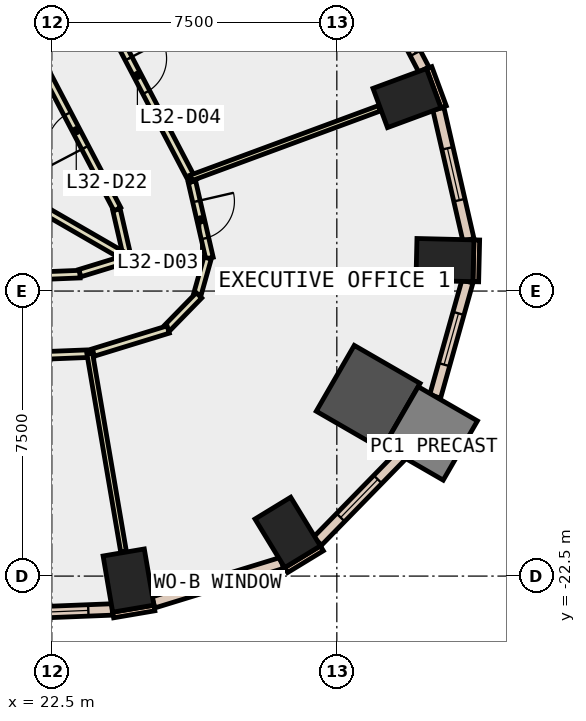
"""IFC4 building model, lengths in metres.
Left out: names, types, materials, properties, quantities, classifications, styles, units other than length and angle.
Written with IfcOpenShell. Run it as: python <this file> out.ifc"""

import sys

from ifc_helpers import new_model, si_unit, direction, frame, frame_2d, origin, origin_2d, place, context, subcontext, project, spatial, rectangle, extrude, element, fill, save


model = new_model("IFC4")
c1 = context("Model", 3, precision=1e-05, world=origin(), true_north=direction((0.0, 1.0)))
c2 = subcontext(c1, "Body", "Model", "MODEL_VIEW")
j1 = project(units=[si_unit("LENGTHUNIT", "METRE"), si_unit("PLANEANGLEUNIT", "RADIAN")], contexts=[c1])
p1 = place(None, origin())
s1 = spatial("IfcSite", under=j1, at=p1, CompositionType="ELEMENT")
p2 = place(p1, origin())
s2 = spatial("IfcBuilding", under=s1, at=p2, CompositionType="ELEMENT")
p3 = place(p2, frame((0.0, 0.0, 146.6)))
s3 = spatial("IfcBuildingStorey", under=s2, at=p3, CompositionType="ELEMENT", Elevation=146.6)
for number, where, z_axis, x_axis in (
    (1, (24.518, -22.618, -0.4), (0.0, 0.0, 1.0), (0.986, 0.168, 0.0)),
    (2, (28.707, -21.352, -0.4), (0.0, 0.0, 1.0), (0.854, 0.521, 0.0)),
):
    element("IfcColumn", number, at=place(p3, frame(where, z_axis=z_axis, x_axis=x_axis)), inside=s3, PredefinedType="COLUMN", context=c2, shape_type="SweptSolid", body=[
        extrude(rectangle(XDim=1.1, YDim=1.5, at=origin_2d()), origin(), (0.0, 0.0, 1.0), 4.2),
    ])
p4 = place(p3, frame((30.825, -17.796, -0.4), z_axis=(0.0, 0.0, 1.0), x_axis=(-0.866025403784, 0.5, 0.0)))
e3 = element("IfcColumn", 3, at=p4, inside=s3, PredefinedType="COLUMN", context=c2, shape_type="SweptSolid", body=[
    extrude(rectangle(XDim=2.0, YDim=2.0, at=origin_2d()), origin(), (0.0, 0.0, 1.0), 4.2),
])
for number, where, z_axis, x_axis in (
    (4, (32.845, -14.185, -0.4), (0.0, 0.0, 1.0), (0.024, 1.0, 0.0)),
    (5, (31.846, -9.923, -0.4), (0.0, 0.0, 1.0), (-0.347, 0.938, 0.0)),
):
    element("IfcColumn", number, at=place(p3, frame(where, z_axis=z_axis, x_axis=x_axis)), inside=s3, PredefinedType="COLUMN", context=c2, shape_type="SweptSolid", body=[
        extrude(rectangle(XDim=1.1, YDim=1.5, at=origin_2d()), origin(), (0.0, 0.0, 1.0), 4.2),
    ])
p5 = place(p3, frame((32.47, -18.746, -0.4), z_axis=(0.0, 0.0, 1.0), x_axis=(-0.866025403784, 0.5, 0.0)))
e6 = element("IfcColumn", 6, at=p5, inside=s3, PredefinedType="COLUMN", context=c2, shape_type="SweptSolid", body=[
    extrude(rectangle(XDim=1.8, YDim=1.8, at=origin_2d()), origin(), (0.0, 0.0, 1.0), 4.2),
])
p6 = place(p3, frame((32.81, -10.153, 0.0), z_axis=(0.0, 0.0, 1.0), x_axis=(-0.346425160624, 0.93807761304, 0.0)))
e7 = element("IfcWall", 7, at=p6, inside=s3, PredefinedType="STANDARD", context=c2, shape_type="SweptSolid", body=[
    extrude(rectangle(XDim=1.1, YDim=0.15, at=frame_2d((0.55, 0.0))), origin(), (0.0, 0.0, 1.0), 3.8),
])
p7 = place(p3, frame((24.114, -23.524, 0.0), z_axis=(0.0, 0.0, 1.0), x_axis=(0.985800082077, 0.167923191299, 0.0)))
e8 = element("IfcWall", 8, at=p7, inside=s3, PredefinedType="STANDARD", context=c2, shape_type="SweptSolid", body=[
    extrude(rectangle(XDim=1.101, YDim=0.15, at=frame_2d((0.55, 0.0))), origin(), (0.0, 0.0, 1.0), 3.8),
])
p8 = place(p3, frame((28.667, -22.342, 0.0), z_axis=(0.0, 0.0, 1.0), x_axis=(0.854005542721, 0.520263907071, 0.0)))
e9 = element("IfcWall", 9, at=p8, inside=s3, PredefinedType="STANDARD", context=c2, shape_type="SweptSolid", body=[
    extrude(rectangle(XDim=1.099, YDim=0.15, at=frame_2d((0.55, 0.0))), origin(), (0.0, 0.0, 1.0), 3.8),
])
p9 = place(p3, frame((33.657, -14.755, 0.0), z_axis=(0.0, 0.0, 1.0), x_axis=(0.023744690764, 0.999718055084, 0.0)))
e10 = element("IfcWall", 10, at=p9, inside=s3, PredefinedType="STANDARD", context=c2, shape_type="SweptSolid", body=[
    extrude(rectangle(XDim=1.1, YDim=0.15, at=frame_2d((0.55, 0.0))), origin(), (0.0, 0.0, 1.0), 3.8),
])
p10 = place(p3, frame((16.778, -23.67, 0.0), z_axis=(0.0, 0.0, 1.0), x_axis=(0.999203621229, 0.039901420066, 0.0)))
e11 = element("IfcWall", 11, at=p10, inside=s3, PredefinedType="STANDARD", context=c2, shape_type="SweptSolid", body=[
    extrude(rectangle(XDim=7.318, YDim=0.3, at=frame_2d((3.659, 0.0))), origin(), (0.0, 0.0, 1.0), 3.8),
])
p11 = place(p10, frame((0.629, 0.0, 0.9)))
e12 = element("IfcOpeningElement", 12, at=p11, cuts=e11, PredefinedType="OPENING", context=c2, shape_type="SweptSolid", body=[
    extrude(rectangle(XDim=2.4, YDim=2.6, at=frame_2d((1.2, 1.3))), frame((0.0, 0.16, 0.0), z_axis=(0.0, -1.0, 0.0), x_axis=(1.0, 0.0, 0.0)), (0.0, 0.0, 1.0), 0.32),
])
p12 = place(p10, frame((4.288, 0.0, 0.9)))
e13 = element("IfcOpeningElement", 13, at=p12, cuts=e11, PredefinedType="OPENING", context=c2, shape_type="SweptSolid", body=[
    extrude(rectangle(XDim=2.4, YDim=2.6, at=frame_2d((1.2, 1.3))), frame((0.0, 0.16, 0.0), z_axis=(0.0, -1.0, 0.0), x_axis=(1.0, 0.0, 0.0)), (0.0, 0.0, 1.0), 0.32),
])
p13 = place(p3, frame((25.173, -23.193, 0.0), z_axis=(0.0, 0.0, 1.0), x_axis=(0.955874475611, 0.293775402094, 0.0)))
e14 = element("IfcWall", 14, at=p13, inside=s3, PredefinedType="STANDARD", context=c2, shape_type="SweptSolid", body=[
    extrude(rectangle(XDim=3.537, YDim=0.3, at=frame_2d((1.769, 0.0))), origin(), (0.0, 0.0, 1.0), 3.8),
])
p14 = place(p13, frame((1.069, 0.0, 0.9)))
e15 = element("IfcOpeningElement", 15, at=p14, cuts=e14, PredefinedType="OPENING", context=c2, shape_type="SweptSolid", body=[
    extrude(rectangle(XDim=1.4, YDim=2.6, at=frame_2d((0.7, 1.3))), frame((0.0, 0.16, 0.0), z_axis=(0.0, -1.0, 0.0), x_axis=(1.0, 0.0, 0.0)), (0.0, 0.0, 1.0), 0.32),
])
p15 = place(p3, frame((29.491, -21.582, 0.0), z_axis=(0.0, 0.0, 1.0), x_axis=(0.698633260198, 0.715479956215, 0.0)))
e16 = element("IfcWall", 16, at=p15, inside=s3, PredefinedType="STANDARD", context=c2, shape_type="SweptSolid", body=[
    extrude(rectangle(XDim=3.145, YDim=0.3, at=frame_2d((1.572, 0.0))), origin(), (0.0, 0.0, 1.0), 3.8),
])
p16 = place(p15, frame((0.872, 0.0, 0.9)))
e17 = element("IfcOpeningElement", 17, at=p16, cuts=e16, PredefinedType="OPENING", context=c2, shape_type="SweptSolid", body=[
    extrude(rectangle(XDim=1.4, YDim=2.6, at=frame_2d((0.7, 1.3))), frame((0.0, 0.16, 0.0), z_axis=(0.0, -1.0, 0.0), x_axis=(1.0, 0.0, 0.0)), (0.0, 0.0, 1.0), 0.32),
])
p17 = place(p3, frame((32.587, -17.775, 0.0), z_axis=(0.0, 0.0, 1.0), x_axis=(0.270471130801, 0.962728085912, 0.0)))
e18 = element("IfcWall", 18, at=p17, inside=s3, PredefinedType="STANDARD", context=c2, shape_type="SweptSolid", body=[
    extrude(rectangle(XDim=3.143, YDim=0.3, at=frame_2d((1.572, 0.0))), origin(), (0.0, 0.0, 1.0), 3.8),
])
p18 = place(p17, frame((0.872, 0.0, 0.9)))
e19 = element("IfcOpeningElement", 19, at=p18, cuts=e18, PredefinedType="OPENING", context=c2, shape_type="SweptSolid", body=[
    extrude(rectangle(XDim=1.4, YDim=2.6, at=frame_2d((0.7, 1.3))), frame((0.0, 0.16, 0.0), z_axis=(0.0, -1.0, 0.0), x_axis=(1.0, 0.0, 0.0)), (0.0, 0.0, 1.0), 0.32),
])
p19 = place(p3, frame((33.463, -13.651, 0.0), z_axis=(0.0, 0.0, 1.0), x_axis=(-0.223538714932, 0.974695051247, 0.0)))
e20 = element("IfcWall", 20, at=p19, inside=s3, PredefinedType="STANDARD", context=c2, shape_type="SweptSolid", body=[
    extrude(rectangle(XDim=3.538, YDim=0.3, at=frame_2d((1.769, 0.0))), origin(), (0.0, 0.0, 1.0), 3.8),
])
p20 = place(p19, frame((1.069, 0.0, 0.9)))
e21 = element("IfcOpeningElement", 21, at=p20, cuts=e20, PredefinedType="OPENING", context=c2, shape_type="SweptSolid", body=[
    extrude(rectangle(XDim=1.4, YDim=2.6, at=frame_2d((0.7, 1.3))), frame((0.0, 0.16, 0.0), z_axis=(0.0, -1.0, 0.0), x_axis=(1.0, 0.0, 0.0)), (0.0, 0.0, 1.0), 0.32),
])
p21 = place(p3, frame((32.291, -9.173, 0.0), z_axis=(0.0, 0.0, 1.0), x_axis=(-0.463809970306, 0.885934710599, 0.0)))
e22 = element("IfcWall", 22, at=p21, inside=s3, PredefinedType="STANDARD", context=c2, shape_type="SweptSolid", body=[
    extrude(rectangle(XDim=5.927, YDim=0.3, at=frame_2d((2.963, 0.0))), origin(), (0.0, 0.0, 1.0), 3.8),
])
p22 = place(p21, frame((0.482, 0.0, 0.9)))
e23 = element("IfcOpeningElement", 23, at=p22, cuts=e22, PredefinedType="OPENING", context=c2, shape_type="SweptSolid", body=[
    extrude(rectangle(XDim=2.0, YDim=2.6, at=frame_2d((1.0, 1.3))), frame((0.0, 0.16, 0.0), z_axis=(0.0, -1.0, 0.0), x_axis=(1.0, 0.0, 0.0)), (0.0, 0.0, 1.0), 0.32),
])
p23 = place(p21, frame((3.445, 0.0, 0.9)))
e24 = element("IfcOpeningElement", 24, at=p23, cuts=e22, PredefinedType="OPENING", context=c2, shape_type="SweptSolid", body=[
    extrude(rectangle(XDim=2.0, YDim=2.6, at=frame_2d((1.0, 1.3))), frame((0.0, 0.16, 0.0), z_axis=(0.0, -1.0, 0.0), x_axis=(1.0, 0.0, 0.0)), (0.0, 0.0, 1.0), 0.32),
])
p24 = place(p3, frame((18.585, -14.741, 0.0), z_axis=(0.0, 0.0, 1.0), x_axis=(0.99920304932, 0.039915739113, 0.0)))
e25 = element("IfcWall", 25, at=p24, inside=s3, PredefinedType="PARTITIONING", context=c2, shape_type="SweptSolid", body=[
    extrude(rectangle(XDim=4.661, YDim=0.2, at=frame_2d((2.33, 0.0))), origin(), (0.0, 0.0, 1.0), 3.8),
])
p25 = place(p24, frame((1.83, 0.0, 0.0)))
e26 = element("IfcOpeningElement", 26, at=p25, cuts=e25, PredefinedType="OPENING", context=c2, shape_type="SweptSolid", body=[
    extrude(rectangle(XDim=1.0, YDim=2.1, at=frame_2d((0.5, 1.05))), frame((0.0, 0.11, 0.0), z_axis=(0.0, -1.0, 0.0), x_axis=(1.0, 0.0, 0.0)), (0.0, 0.0, 1.0), 0.22),
])
p26 = place(p3, frame((23.238, -14.529, 0.0), z_axis=(0.0, 0.0, 1.0), x_axis=(0.956086269468, 0.293085389152, 0.0)))
e27 = element("IfcWall", 27, at=p26, inside=s3, PredefinedType="PARTITIONING", context=c2, shape_type="SweptSolid", body=[
    extrude(rectangle(XDim=1.252, YDim=0.2, at=frame_2d((0.626, 0.0))), origin(), (0.0, 0.0, 1.0), 3.8),
])
p27 = place(p3, frame((24.482, -14.081, 0.0), z_axis=(0.0, 0.0, 1.0), x_axis=(-0.223967203961, 0.974596681479, 0.0)))
e28 = element("IfcWall", 28, at=p27, inside=s3, PredefinedType="PARTITIONING", context=c2, shape_type="SweptSolid", body=[
    extrude(rectangle(XDim=1.259, YDim=0.2, at=frame_2d((0.629, 0.0))), origin(), (0.0, 0.0, 1.0), 3.8),
])
p28 = place(p3, frame((24.224, -12.845, 0.0), z_axis=(0.0, 0.0, 1.0), x_axis=(-0.463819025987, 0.885929969655, 0.0)))
e29 = element("IfcWall", 29, at=p28, inside=s3, PredefinedType="PARTITIONING", context=c2, shape_type="SweptSolid", body=[
    extrude(rectangle(XDim=4.659, YDim=0.2, at=frame_2d((2.33, 0.0))), origin(), (0.0, 0.0, 1.0), 3.8),
])
p29 = place(p28, frame((1.83, 0.0, 0.0)))
e30 = element("IfcOpeningElement", 30, at=p29, cuts=e29, PredefinedType="OPENING", context=c2, shape_type="SweptSolid", body=[
    extrude(rectangle(XDim=1.0, YDim=2.1, at=frame_2d((0.5, 1.05))), frame((0.0, 0.11, 0.0), z_axis=(0.0, -1.0, 0.0), x_axis=(1.0, 0.0, 0.0)), (0.0, 0.0, 1.0), 0.22),
])
p30 = place(p3, frame((23.598, -16.642, 0.0), z_axis=(0.0, 0.0, 1.0), x_axis=(-0.999203655486, -0.039900562205, 0.0)))
e31 = element("IfcWall", 31, at=p30, inside=s3, PredefinedType="PARTITIONING", context=c2, shape_type="SweptSolid", body=[
    extrude(rectangle(XDim=7.514, YDim=0.2, at=frame_2d((3.757, 0.0))), origin(), (0.0, 0.0, 1.0), 3.8),
])
p31 = place(p30, frame((3.332, 0.0, 0.0)))
e32 = element("IfcOpeningElement", 32, at=p31, cuts=e31, PredefinedType="OPENING", context=c2, shape_type="SweptSolid", body=[
    extrude(rectangle(XDim=1.0, YDim=2.1, at=frame_2d((0.5, 1.05))), frame((0.0, 0.11, 0.0), z_axis=(0.0, -1.0, 0.0), x_axis=(1.0, 0.0, 0.0)), (0.0, 0.0, 1.0), 0.22),
])
p32 = place(p3, frame((26.186, -12.12, 0.0), z_axis=(0.0, 0.0, 1.0), x_axis=(0.224108401048, -0.974564222912, 0.0)))
e33 = element("IfcWall", 33, at=p32, inside=s3, PredefinedType="PARTITIONING", context=c2, shape_type="SweptSolid", body=[
    extrude(rectangle(XDim=2.065, YDim=0.2, at=frame_2d((1.033, 0.0))), origin(), (0.0, 0.0, 1.0), 3.8),
])
p33 = place(p32, frame((0.533, 0.0, 0.0)))
e34 = element("IfcOpeningElement", 34, at=p33, cuts=e33, PredefinedType="OPENING", context=c2, shape_type="SweptSolid", body=[
    extrude(rectangle(XDim=1.0, YDim=2.1, at=frame_2d((0.5, 1.05))), frame((0.0, 0.11, 0.0), z_axis=(0.0, -1.0, 0.0), x_axis=(1.0, 0.0, 0.0)), (0.0, 0.0, 1.0), 0.22),
])
p34 = place(p3, frame((26.599, -14.132, 0.0), z_axis=(0.0, 0.0, 1.0), x_axis=(-0.270631784819, -0.962682936925, 0.0)))
e35 = element("IfcWall", 35, at=p34, inside=s3, PredefinedType="PARTITIONING", context=c2, shape_type="SweptSolid", body=[
    extrude(rectangle(XDim=0.994, YDim=0.2, at=frame_2d((0.497, 0.0))), origin(), (0.0, 0.0, 1.0), 3.8),
])
p35 = place(p3, frame((26.373, -15.114, 0.0), z_axis=(0.0, 0.0, 1.0), x_axis=(-0.698272822523, -0.715831729756, 0.0)))
e36 = element("IfcWall", 36, at=p35, inside=s3, PredefinedType="PARTITIONING", context=c2, shape_type="SweptSolid", body=[
    extrude(rectangle(XDim=1.196, YDim=0.2, at=frame_2d((0.598, 0.0))), origin(), (0.0, 0.0, 1.0), 3.8),
])
p36 = place(p3, frame((25.563, -16.012, 0.0), z_axis=(0.0, 0.0, 1.0), x_axis=(-0.955896815358, -0.293702704087, 0.0)))
e37 = element("IfcWall", 37, at=p36, inside=s3, PredefinedType="PARTITIONING", context=c2, shape_type="SweptSolid", body=[
    extrude(rectangle(XDim=2.06, YDim=0.2, at=frame_2d((1.03, 0.0))), origin(), (0.0, 0.0, 1.0), 3.8),
])
p37 = place(p3, frame((23.294, -6.541, 0.0), z_axis=(0.0, 0.0, 1.0), x_axis=(0.463802391881, -0.885938678062, 0.0)))
e38 = element("IfcWall", 38, at=p37, inside=s3, PredefinedType="PARTITIONING", context=c2, shape_type="SweptSolid", body=[
    extrude(rectangle(XDim=6.287, YDim=0.2, at=frame_2d((3.144, 0.0))), origin(), (0.0, 0.0, 1.0), 3.8),
])
p38 = place(p37, frame((2.644, 0.0, 0.0)))
e39 = element("IfcOpeningElement", 39, at=p38, cuts=e38, PredefinedType="OPENING", context=c2, shape_type="SweptSolid", body=[
    extrude(rectangle(XDim=1.0, YDim=2.1, at=frame_2d((0.5, 1.05))), frame((0.0, 0.11, 0.0), z_axis=(0.0, -1.0, 0.0), x_axis=(1.0, 0.0, 0.0)), (0.0, 0.0, 1.0), 0.22),
])
p39 = place(p3, frame((20.31, -11.721, 0.0), z_axis=(0.0, 0.0, 1.0), x_axis=(0.86603399059, -0.499985126921, 0.0)))
e40 = element("IfcWall", 40, at=p39, inside=s3, PredefinedType="PARTITIONING", context=c2, shape_type="SweptSolid", body=[
    extrude(rectangle(XDim=4.854, YDim=0.2, at=frame_2d((2.427, 0.0))), origin(), (0.0, 0.0, 1.0), 3.8),
])
p40 = place(p3, frame((23.498, -16.646, 0.0), z_axis=(0.0, 0.0, 1.0), x_axis=(0.168275674737, -0.985739974482, 0.0)))
e41 = element("IfcWall", 41, at=p40, inside=s3, PredefinedType="PARTITIONING", context=c2, shape_type="SweptSolid", body=[
    extrude(rectangle(XDim=5.288, YDim=0.15, at=frame_2d((2.644, 0.0))), origin(), (0.0, 0.0, 1.0), 3.8),
])
p41 = place(p3, frame((26.164, -12.023, 0.0), z_axis=(0.0, 0.0, 1.0), x_axis=(0.937995804261, 0.346646608505, 0.0)))
e42 = element("IfcWall", 42, at=p41, inside=s3, PredefinedType="PARTITIONING", context=c2, shape_type="SweptSolid", body=[
    extrude(rectangle(XDim=5.288, YDim=0.15, at=frame_2d((2.644, 0.0))), origin(), (0.0, 0.0, 1.0), 3.8),
])
p42 = place(p12, origin())
e43 = element("IfcWindow", 43, at=p42, inside=s3, PartitioningType="SINGLE_PANEL", PredefinedType="WINDOW", context=c2, shape_type="SweptSolid", body=[
    extrude(rectangle(XDim=2.4, YDim=2.6, at=frame_2d((1.2, 1.3))), frame((0.0, 0.03, 0.0), z_axis=(0.0, -1.0, 0.0), x_axis=(1.0, 0.0, 0.0)), (0.0, 0.0, 1.0), 0.06),
])
fill(e13, e43)
p43 = place(p14, origin())
e44 = element("IfcWindow", 44, at=p43, inside=s3, PartitioningType="SINGLE_PANEL", PredefinedType="WINDOW", context=c2, shape_type="SweptSolid", body=[
    extrude(rectangle(XDim=1.4, YDim=2.6, at=frame_2d((0.7, 1.3))), frame((0.0, 0.03, 0.0), z_axis=(0.0, -1.0, 0.0), x_axis=(1.0, 0.0, 0.0)), (0.0, 0.0, 1.0), 0.06),
])
fill(e15, e44)
p44 = place(p16, origin())
e45 = element("IfcWindow", 45, at=p44, inside=s3, PartitioningType="SINGLE_PANEL", PredefinedType="WINDOW", context=c2, shape_type="SweptSolid", body=[
    extrude(rectangle(XDim=1.4, YDim=2.6, at=frame_2d((0.7, 1.3))), frame((0.0, 0.03, 0.0), z_axis=(0.0, -1.0, 0.0), x_axis=(1.0, 0.0, 0.0)), (0.0, 0.0, 1.0), 0.06),
])
fill(e17, e45)
p45 = place(p18, origin())
e46 = element("IfcWindow", 46, at=p45, inside=s3, PartitioningType="SINGLE_PANEL", PredefinedType="WINDOW", context=c2, shape_type="SweptSolid", body=[
    extrude(rectangle(XDim=1.4, YDim=2.6, at=frame_2d((0.7, 1.3))), frame((0.0, 0.03, 0.0), z_axis=(0.0, -1.0, 0.0), x_axis=(1.0, 0.0, 0.0)), (0.0, 0.0, 1.0), 0.06),
])
fill(e19, e46)
p46 = place(p20, origin())
e47 = element("IfcWindow", 47, at=p46, inside=s3, PartitioningType="SINGLE_PANEL", PredefinedType="WINDOW", context=c2, shape_type="SweptSolid", body=[
    extrude(rectangle(XDim=1.4, YDim=2.6, at=frame_2d((0.7, 1.3))), frame((0.0, 0.03, 0.0), z_axis=(0.0, -1.0, 0.0), x_axis=(1.0, 0.0, 0.0)), (0.0, 0.0, 1.0), 0.06),
])
fill(e21, e47)
p47 = place(p22, origin())
e48 = element("IfcWindow", 48, at=p47, inside=s3, PartitioningType="SINGLE_PANEL", PredefinedType="WINDOW", context=c2, shape_type="SweptSolid", body=[
    extrude(rectangle(XDim=2.0, YDim=2.6, at=frame_2d((1.0, 1.3))), frame((0.0, 0.03, 0.0), z_axis=(0.0, -1.0, 0.0), x_axis=(1.0, 0.0, 0.0)), (0.0, 0.0, 1.0), 0.06),
])
fill(e23, e48)
p48 = place(p33, origin())
e49 = element("IfcDoor", 49, at=p48, inside=s3, OperationType="SINGLE_SWING_LEFT", PredefinedType="DOOR", context=c2, shape_type="SweptSolid", body=[
    extrude(rectangle(XDim=1.0, YDim=2.1, at=frame_2d((0.5, 1.05))), frame((0.0, 0.025, 0.0), z_axis=(0.0, -1.0, 0.0), x_axis=(1.0, 0.0, 0.0)), (0.0, 0.0, 1.0), 0.05),
])
fill(e34, e49)
p49 = place(p38, origin())
e50 = element("IfcDoor", 50, at=p49, inside=s3, OperationType="SINGLE_SWING_LEFT", PredefinedType="DOOR", context=c2, shape_type="SweptSolid", body=[
    extrude(rectangle(XDim=1.0, YDim=2.1, at=frame_2d((0.5, 1.05))), frame((0.0, 0.025, 0.0), z_axis=(0.0, -1.0, 0.0), x_axis=(1.0, 0.0, 0.0)), (0.0, 0.0, 1.0), 0.05),
])
fill(e39, e50)
p50 = place(p29, origin())
e51 = element("IfcDoor", 51, at=p50, inside=s3, OperationType="SINGLE_SWING_LEFT", PredefinedType="DOOR", context=c2, shape_type="SweptSolid", body=[
    extrude(rectangle(XDim=1.0, YDim=2.1, at=frame_2d((0.5, 1.05))), frame((0.0, 0.025, 0.0), z_axis=(0.0, -1.0, 0.0), x_axis=(1.0, 0.0, 0.0)), (0.0, 0.0, 1.0), 0.05),
])
fill(e30, e51)
save(model, sys.argv[1])
